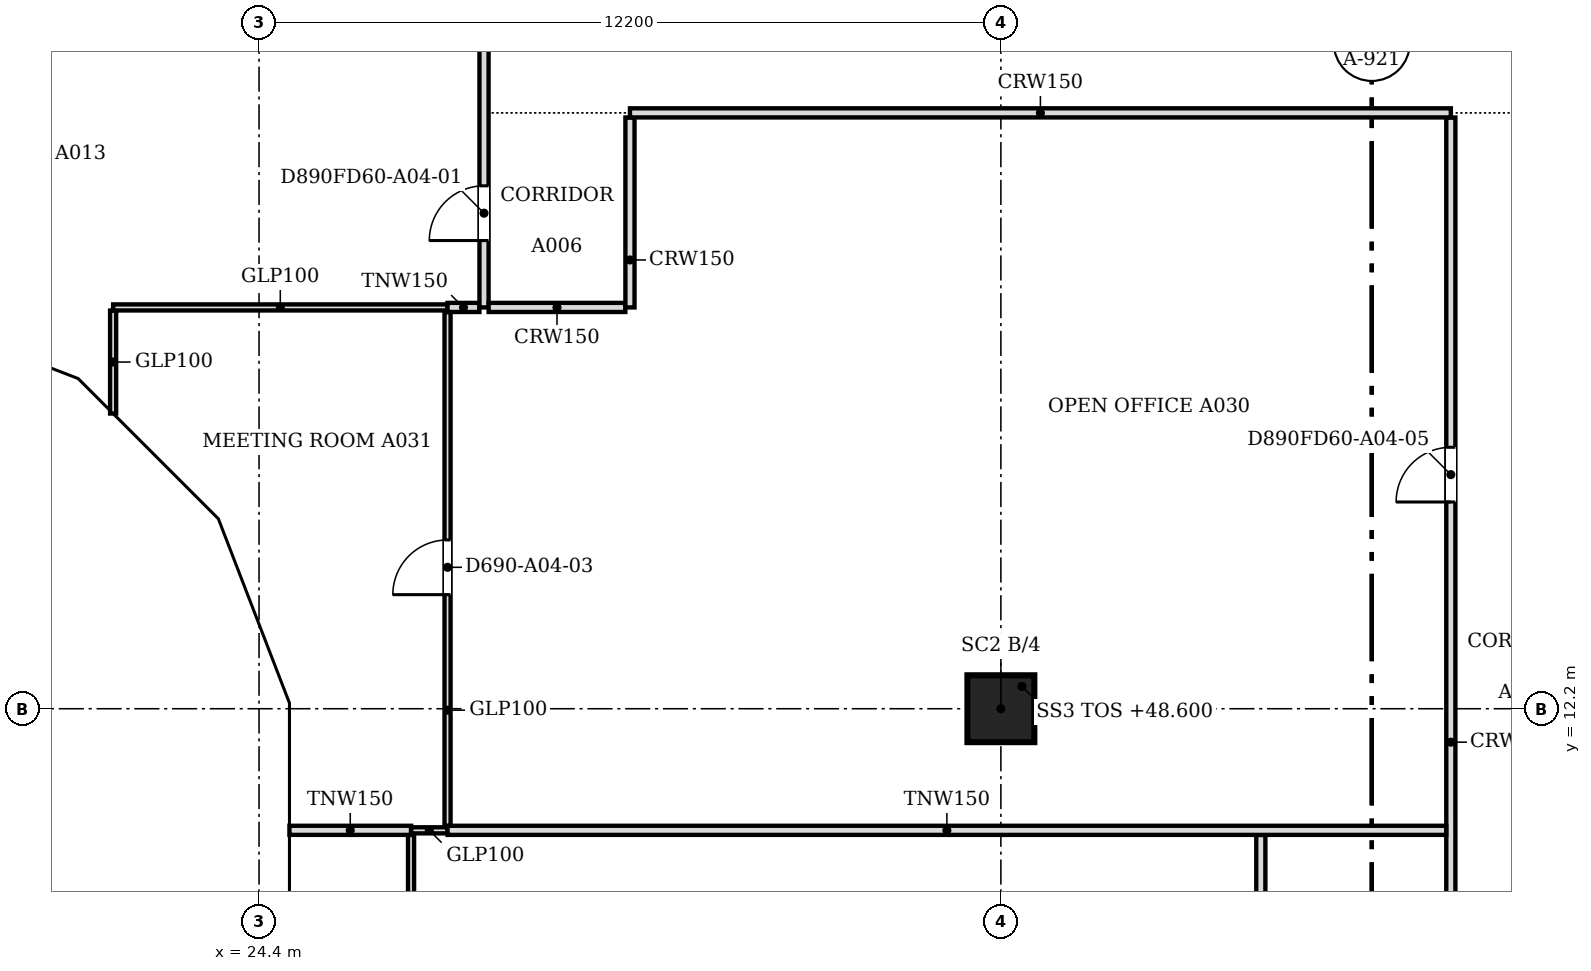
"""IFC4 building model, lengths in metres.
Left out: names, types, materials, properties, quantities, classifications, styles, units other than length and angle.
Written with IfcOpenShell. Run it as: python <this file> out.ifc"""

import sys

from ifc_helpers import new_model, si_unit, direction, frame, frame_2d, origin, origin_2d, place, context, subcontext, project, spatial, polyline, rectangle, outline, extrude, faceted_brep, source, transform, mapped, element, fill, save


model = new_model("IFC4")
c1 = context("Model", 3, precision=1e-05, world=origin(), true_north=direction((0.0, 1.0)))
c2 = subcontext(c1, "Body", "Model", "MODEL_VIEW")
j1 = project(units=[si_unit("LENGTHUNIT", "METRE"), si_unit("PLANEANGLEUNIT", "RADIAN")], contexts=[c1])
p1 = place(None, origin())
s1 = spatial("IfcSite", under=j1, at=p1, CompositionType="ELEMENT")
p2 = place(p1, origin())
s2 = spatial("IfcBuilding", under=s1, at=p2, CompositionType="ELEMENT")
p3 = place(p2, frame((0.0, 0.0, 48.6)))
s3 = spatial("IfcBuildingStorey", under=s2, at=p3, CompositionType="ELEMENT", Elevation=48.6)
p4 = place(p3, frame((36.6, 12.2, 0.0), z_axis=(0.0, 0.0, 1.0), x_axis=(1.0, 0.0, 0.0)))
e1 = element("IfcColumn", 1, at=p4, inside=s3, PredefinedType="COLUMN", context=c2, shape_type="SweptSolid", body=[
    extrude(rectangle(XDim=1.1, YDim=1.1, at=origin_2d()), origin(), (0.0, 0.0, 1.0), 3.6),
])
m1 = source(origin(), c2, "Body", "Brep", [
    faceted_brep([(0.093, -0.25, 0.056), (3.143, -0.25, 3.736), (3.143, -0.25, 3.864), (0.093, -0.25, 7.544), (0.0, 0.25, 7.543), (0.047, 0.25, 7.6), (3.196, 0.25, 3.8), (0.047, 0.25, 0.0), (0.0, 0.25, 0.057), (3.196, -0.0, 3.8), (0.047, 0.0, 0.0), (0.047, 0.0, 7.6)], [[[0, 1, 2, 3]], [[4, 5, 6, 7, 8]], [[7, 6, 9, 1, 0, 10]], [[6, 5, 11, 3, 2, 9]], [[5, 4, 11]], [[8, 7, 10]], [[8, 10, 0, 3, 11, 4]], [[1, 9, 2]]]),
])
p5 = place(p3, frame((18.303, 18.567, -3.8), z_axis=(0.0, 0.0, 1.0), x_axis=(0.932978940178, -0.359930961693, 0.0)))
e2 = element("IfcWall", 2, at=p5, inside=s3, PredefinedType="SOLIDWALL", context=c2, shape_type="MappedRepresentation", body=[
    mapped(m1, transform((0.0, 0.0, 0.0), scale=1.0)),
])
m2 = source(origin(), c2, "Body", "SweptSolid", [
    extrude(outline(polyline([(0.247, 0.633), (2.871, 3.8), (0.247, 6.967), (0.247, 0.633)])), frame((0.0, 0.26, 0.0), z_axis=(0.0, -1.0, 0.0), x_axis=(1.0, 0.0, 0.0)), (0.0, 0.0, 1.0), 0.52),
])
p6 = place(p5, origin())
e3 = element("IfcOpeningElement", 3, at=p6, cuts=e2, PredefinedType="OPENING", context=c2, shape_type="MappedRepresentation", body=[
    mapped(m2, transform((0.0, 0.0, 0.0), scale=1.0)),
])
m3 = source(origin(), c2, "Body", "Brep", [
    faceted_brep([(3.103, -0.25, 7.536), (0.053, -0.25, 3.864), (0.053, -0.25, 3.736), (3.103, -0.25, 0.064), (0.0, 0.25, 3.8), (3.156, 0.25, 7.6), (3.209, 0.25, 7.536), (3.209, 0.25, 0.064), (3.156, 0.25, 0.0), (3.156, -0.0, 0.0), (3.156, -0.0, 7.6), (0.0, 0.0, 3.8)], [[[0, 1, 2, 3]], [[4, 5, 6, 7, 8]], [[8, 7, 9]], [[6, 5, 10]], [[5, 4, 11, 1, 0, 10]], [[4, 8, 9, 3, 2, 11]], [[2, 1, 11]], [[3, 9, 7, 6, 10, 0]]]),
])
p7 = place(p3, frame((21.285, 17.417, -3.8), z_axis=(0.0, 0.0, 1.0), x_axis=(0.707106781187, -0.707106781187, 0.0)))
e4 = element("IfcWall", 4, at=p7, inside=s3, PredefinedType="SOLIDWALL", context=c2, shape_type="MappedRepresentation", body=[
    mapped(m3, transform((0.0, 0.0, 0.0), scale=1.0)),
])
m4 = source(origin(), c2, "Body", "SweptSolid", [
    extrude(outline(polyline([(2.956, 6.968), (0.325, 3.8), (2.956, 0.632), (2.956, 6.968)])), frame((0.0, 0.26, 0.0), z_axis=(0.0, -1.0, 0.0), x_axis=(1.0, 0.0, 0.0)), (0.0, 0.0, 1.0), 0.52),
])
p8 = place(p7, origin())
e5 = element("IfcOpeningElement", 5, at=p8, cuts=e4, PredefinedType="OPENING", context=c2, shape_type="MappedRepresentation", body=[
    mapped(m4, transform((0.0, 0.0, 0.0), scale=1.0)),
])
m5 = source(origin(), c2, "Body", "Brep", [
    faceted_brep([(0.106, -0.25, 0.064), (3.156, -0.25, 3.744), (3.156, -0.25, 3.856), (0.106, -0.25, 7.536), (0.0, 0.25, 7.536), (0.053, 0.25, 7.6), (3.202, 0.25, 3.8), (0.053, 0.25, 0.0), (0.0, 0.25, 0.064), (3.202, -0.0, 3.8), (0.053, 0.0, 0.0), (0.053, 0.0, 7.6)], [[[0, 1, 2, 3]], [[4, 5, 6, 7, 8]], [[7, 6, 9, 1, 0, 10]], [[6, 5, 11, 3, 2, 9]], [[5, 4, 11]], [[8, 7, 10]], [[8, 10, 0, 3, 11, 4]], [[1, 9, 2]]]),
])
p9 = place(p3, frame((23.497, 15.234, -3.8), z_axis=(0.0, 0.0, 1.0), x_axis=(0.359913782069, -0.932985567668, 0.0)))
e6 = element("IfcWall", 6, at=p9, inside=s3, PredefinedType="SOLIDWALL", context=c2, shape_type="MappedRepresentation", body=[
    mapped(m5, transform((0.0, 0.0, 0.0), scale=1.0)),
])
m6 = source(origin(), c2, "Body", "SweptSolid", [
    extrude(outline(polyline([(0.253, 0.633), (2.878, 3.8), (0.253, 6.967), (0.253, 0.633)])), frame((0.0, 0.26, 0.0), z_axis=(0.0, -1.0, 0.0), x_axis=(1.0, 0.0, 0.0)), (0.0, 0.0, 1.0), 0.52),
])
p10 = place(p9, origin())
e7 = element("IfcOpeningElement", 7, at=p10, cuts=e6, PredefinedType="OPENING", context=c2, shape_type="MappedRepresentation", body=[
    mapped(m6, transform((0.0, 0.0, 0.0), scale=1.0)),
])
m7 = source(origin(), c2, "Body", "Brep", [
    faceted_brep([(3.096, -0.25, 0.0), (6.1, -0.25, 3.8), (3.096, -0.25, 7.6), (0.047, -0.25, 3.857), (0.047, -0.25, 3.743), (0.0, 0.25, 3.8), (3.096, 0.25, 7.6), (6.053, 0.25, 3.859), (6.053, 0.25, 3.741), (3.096, 0.25, 0.0), (6.1, -0.0, 3.8), (0.0, 0.0, 3.8)], [[[0, 1, 2, 3, 4]], [[5, 6, 7, 8, 9]], [[9, 8, 10, 1, 0]], [[7, 6, 2, 1, 10]], [[6, 5, 11, 3, 2]], [[5, 9, 0, 4, 11]], [[4, 3, 11]], [[8, 7, 10]]]),
])
p11 = place(p3, frame((24.65, 12.247, -3.8), z_axis=(0.0, 0.0, 1.0), x_axis=(0.0, -1.0, 0.0)))
e8 = element("IfcWall", 8, at=p11, inside=s3, PredefinedType="SOLIDWALL", context=c2, shape_type="MappedRepresentation", body=[
    mapped(m7, transform((0.0, 0.0, 0.0), scale=1.0)),
])
m8 = source(origin(), c2, "Body", "SweptSolid", [
    extrude(outline(polyline([(3.094, 0.399), (5.781, 3.8), (3.094, 7.2), (0.323, 3.8), (3.094, 0.399)])), frame((0.0, 0.26, 0.0), z_axis=(0.0, -1.0, 0.0), x_axis=(1.0, 0.0, 0.0)), (0.0, 0.0, 1.0), 0.52),
])
p12 = place(p11, origin())
e9 = element("IfcOpeningElement", 9, at=p12, cuts=e8, PredefinedType="OPENING", context=c2, shape_type="MappedRepresentation", body=[
    mapped(m8, transform((0.0, 0.0, 0.0), scale=1.0)),
])
p13 = place(p2, frame((0.0, 0.0, 52.4)))
s4 = spatial("IfcBuildingStorey", under=s2, at=p13, CompositionType="ELEMENT", Elevation=52.4)
m9 = source(origin(), c2, "Body", "Brep", [
    faceted_brep([(3.096, -0.25, 7.536), (0.047, -0.25, 3.856), (0.047, -0.25, 3.744), (3.096, -0.25, 0.064), (0.0, 0.25, 3.8), (3.149, 0.25, 7.6), (3.202, 0.25, 7.536), (3.202, 0.25, 0.064), (3.149, 0.25, 0.0), (3.149, -0.0, 0.0), (3.149, -0.0, 7.6), (0.0, 0.0, 3.8)], [[[0, 1, 2, 3]], [[4, 5, 6, 7, 8]], [[8, 7, 9]], [[6, 5, 10]], [[5, 4, 11, 1, 0, 10]], [[4, 8, 9, 3, 2, 11]], [[11, 2, 1]], [[3, 9, 7, 6, 10, 0]]]),
])
p14 = place(p13, frame((18.346, 18.55, -3.8), z_axis=(0.0, 0.0, 1.0), x_axis=(0.932985567668, -0.359913782069, 0.0)))
e10 = element("IfcWall", 10, at=p14, inside=s4, PredefinedType="SOLIDWALL", context=c2, shape_type="MappedRepresentation", body=[
    mapped(m9, transform((0.0, 0.0, 0.0), scale=1.0)),
])
m10 = source(origin(), c2, "Body", "SweptSolid", [
    extrude(outline(polyline([(2.949, 6.967), (0.325, 3.8), (2.949, 0.633), (2.949, 6.967)])), frame((0.0, 0.26, 0.0), z_axis=(0.0, -1.0, 0.0), x_axis=(1.0, 0.0, 0.0)), (0.0, 0.0, 1.0), 0.52),
])
p15 = place(p14, origin())
e11 = element("IfcOpeningElement", 11, at=p15, cuts=e10, PredefinedType="OPENING", context=c2, shape_type="MappedRepresentation", body=[
    mapped(m10, transform((0.0, 0.0, 0.0), scale=1.0)),
])
m11 = source(origin(), c2, "Body", "Brep", [
    faceted_brep([(0.106, -0.25, 0.064), (3.156, -0.25, 3.736), (3.156, -0.25, 3.864), (0.106, -0.25, 7.536), (0.0, 0.25, 7.536), (0.053, 0.25, 7.6), (3.209, 0.25, 3.8), (0.053, 0.25, 0.0), (0.0, 0.25, 0.064), (3.209, -0.0, 3.8), (0.053, 0.0, 0.0), (0.053, 0.0, 7.6)], [[[0, 1, 2, 3]], [[4, 5, 6, 7, 8]], [[7, 6, 9, 1, 0, 10]], [[6, 5, 11, 3, 2, 9]], [[5, 4, 11]], [[8, 7, 10]], [[8, 10, 0, 3, 11, 4]], [[1, 9, 2]]]),
])
p16 = place(p13, frame((21.248, 17.454, -3.8), z_axis=(0.0, 0.0, 1.0), x_axis=(0.707106781187, -0.707106781187, 0.0)))
e12 = element("IfcWall", 12, at=p16, inside=s4, PredefinedType="SOLIDWALL", context=c2, shape_type="MappedRepresentation", body=[
    mapped(m11, transform((0.0, 0.0, 0.0), scale=1.0)),
])
m12 = source(origin(), c2, "Body", "SweptSolid", [
    extrude(outline(polyline([(0.253, 0.632), (2.884, 3.8), (0.253, 6.968), (0.253, 0.632)])), frame((0.0, 0.26, 0.0), z_axis=(0.0, -1.0, 0.0), x_axis=(1.0, 0.0, 0.0)), (0.0, 0.0, 1.0), 0.52),
])
p17 = place(p16, origin())
e13 = element("IfcOpeningElement", 13, at=p17, cuts=e12, PredefinedType="OPENING", context=c2, shape_type="MappedRepresentation", body=[
    mapped(m12, transform((0.0, 0.0, 0.0), scale=1.0)),
])
m13 = source(origin(), c2, "Body", "Brep", [
    faceted_brep([(3.103, -0.25, 7.544), (0.053, -0.25, 3.864), (0.053, -0.25, 3.736), (3.103, -0.25, 0.056), (0.0, 0.25, 3.8), (3.149, 0.25, 7.6), (3.196, 0.25, 7.543), (3.196, 0.25, 0.057), (3.149, 0.25, 0.0), (3.149, -0.0, 0.0), (3.149, -0.0, 7.6), (0.0, 0.0, 3.8)], [[[0, 1, 2, 3]], [[4, 5, 6, 7, 8]], [[8, 7, 9]], [[6, 5, 10]], [[5, 4, 11, 1, 0, 10]], [[4, 8, 9, 3, 2, 11]], [[11, 2, 1]], [[3, 9, 7, 6, 10, 0]]]),
])
p18 = place(p13, frame((23.517, 15.185, -3.8), z_axis=(0.0, 0.0, 1.0), x_axis=(0.359864468756, -0.933004589553, 0.0)))
e14 = element("IfcWall", 14, at=p18, inside=s4, PredefinedType="SOLIDWALL", context=c2, shape_type="MappedRepresentation", body=[
    mapped(m13, transform((0.0, 0.0, 0.0), scale=1.0)),
])
p19 = place(p18, origin())
e15 = element("IfcOpeningElement", 15, at=p19, cuts=e14, PredefinedType="OPENING", context=c2, shape_type="MappedRepresentation", body=[
    mapped(m10, transform((0.0, 0.0, 0.0), scale=1.0)),
])
m14 = source(origin(), c2, "Body", "Brep", [
    faceted_brep([(0.093, -0.25, 0.057), (3.143, -0.25, 3.8), (0.093, -0.25, 7.543), (0.0, 0.25, 7.544), (0.047, 0.25, 7.6), (3.143, 0.25, 3.8), (0.047, 0.25, 0.0), (0.0, 0.25, 0.056), (0.047, 0.0, 0.0), (0.047, 0.0, 7.6)], [[[0, 1, 2]], [[3, 4, 5, 6, 7]], [[6, 5, 1, 0, 8]], [[5, 4, 9, 2, 1]], [[4, 3, 9]], [[7, 6, 8]], [[7, 8, 0, 2, 9, 3]]]),
])
p20 = place(p13, frame((24.65, 12.293, -3.8), z_axis=(0.0, 0.0, 1.0), x_axis=(0.0, -1.0, 0.0)))
e16 = element("IfcWall", 16, at=p20, inside=s4, PredefinedType="SOLIDWALL", context=c2, shape_type="MappedRepresentation", body=[
    mapped(m14, transform((0.0, 0.0, 0.0), scale=1.0)),
])
m15 = source(origin(), c2, "Body", "SweptSolid", [
    extrude(outline(polyline([(0.247, 0.641), (2.821, 3.8), (0.247, 6.959), (0.247, 0.641)])), frame((0.0, 0.26, 0.0), z_axis=(0.0, -1.0, 0.0), x_axis=(1.0, 0.0, 0.0)), (0.0, 0.0, 1.0), 0.52),
])
p21 = place(p20, origin())
e17 = element("IfcOpeningElement", 17, at=p21, cuts=e16, PredefinedType="OPENING", context=c2, shape_type="MappedRepresentation", body=[
    mapped(m15, transform((0.0, 0.0, 0.0), scale=1.0)),
])
p22 = place(p3, frame((44.0, 0.5, 0.0), z_axis=(0.0, 0.0, 1.0), x_axis=(0.0, 1.0, 0.0)))
e18 = element("IfcWall", 18, at=p22, inside=s3, PredefinedType="PARTITIONING", context=c2, shape_type="SweptSolid", body=[
    extrude(rectangle(XDim=21.424, YDim=0.15, at=frame_2d((10.712, 0.0))), origin(), (0.0, 0.0, 1.0), 3.067),
])
m16 = source(origin(), c2, "Body", "SweptSolid", [
    extrude(rectangle(XDim=1.0, YDim=2.1, at=frame_2d((0.5, 1.05))), frame((0.0, 0.085, 0.0), z_axis=(0.0, -1.0, 0.0), x_axis=(1.0, 0.0, 0.0)), (0.0, 0.0, 1.0), 0.17),
])
p23 = place(p22, frame((6.2, 0.0, 0.0)))
e19 = element("IfcOpeningElement", 19, at=p23, cuts=e18, PredefinedType="OPENING", context=c2, shape_type="MappedRepresentation", body=[
    mapped(m16, transform((0.0, 0.0, 0.0), scale=1.0)),
])
m17 = source(origin(), c2, "Body", "SweptSolid", [
    extrude(rectangle(XDim=0.9, YDim=2.1, at=frame_2d((0.45, 1.05))), frame((0.0, 0.085, 0.0), z_axis=(0.0, -1.0, 0.0), x_axis=(1.0, 0.0, 0.0)), (0.0, 0.0, 1.0), 0.17),
])
p24 = place(p22, frame((15.1, 0.0, 0.0)))
e20 = element("IfcOpeningElement", 20, at=p24, cuts=e18, PredefinedType="OPENING", context=c2, shape_type="MappedRepresentation", body=[
    mapped(m17, transform((0.0, 0.0, 0.0), scale=1.0)),
])
p25 = place(p3, frame((26.9, 4.2, 0.0), z_axis=(0.0, 0.0, 1.0), x_axis=(0.0, 1.0, 0.0)))
e21 = element("IfcWall", 21, at=p25, inside=s3, PredefinedType="PARTITIONING", context=c2, shape_type="SweptSolid", body=[
    extrude(rectangle(XDim=5.924, YDim=0.1, at=frame_2d((2.962, 0.0))), origin(), (0.0, 0.0, 1.0), 3.067),
])
m18 = source(origin(), c2, "Body", "SweptSolid", [
    extrude(rectangle(XDim=0.9, YDim=2.1, at=frame_2d((0.45, 1.05))), frame((0.0, 0.06, 0.0), z_axis=(0.0, -1.0, 0.0), x_axis=(1.0, 0.0, 0.0)), (0.0, 0.0, 1.0), 0.12),
])
p26 = place(p25, frame((2.5, 0.0, 0.0)))
e22 = element("IfcOpeningElement", 22, at=p26, cuts=e21, PredefinedType="OPENING", context=c2, shape_type="MappedRepresentation", body=[
    mapped(m18, transform((0.0, 0.0, 0.0), scale=1.0)),
])
p27 = place(p3, frame((40.875, 4.2, 0.0), z_axis=(0.0, 0.0, 1.0), x_axis=(0.0, 1.0, 0.0)))
e23 = element("IfcWall", 23, at=p27, inside=s3, PredefinedType="PARTITIONING", context=c2, shape_type="SweptSolid", body=[
    extrude(rectangle(XDim=5.924, YDim=0.15, at=frame_2d((2.962, 0.0))), origin(), (0.0, 0.0, 1.0), 3.067),
])
p28 = place(p27, frame((2.5, 0.0, 0.0)))
e24 = element("IfcOpeningElement", 24, at=p28, cuts=e23, PredefinedType="OPENING", context=c2, shape_type="MappedRepresentation", body=[
    mapped(m17, transform((0.0, 0.0, 0.0), scale=1.0)),
])
p29 = place(p3, frame((24.9, 10.2, 0.0), z_axis=(0.0, 0.0, 1.0), x_axis=(1.0, 0.0, 0.0)))
e25 = element("IfcWall", 25, at=p29, inside=s3, PredefinedType="PARTITIONING", context=c2, shape_type="SweptSolid", body=[
    extrude(rectangle(XDim=2.0, YDim=0.15, at=frame_2d((1.0, 0.0))), origin(), (0.0, 0.0, 1.0), 3.067),
])
p30 = place(p3, frame((26.901, 10.2, 0.0), z_axis=(0.0, 0.0, 1.0), x_axis=(1.0, 0.0, 0.0)))
e26 = element("IfcWall", 26, at=p30, inside=s3, PredefinedType="PARTITIONING", context=c2, shape_type="SweptSolid", body=[
    extrude(rectangle(XDim=0.598, YDim=0.1, at=frame_2d((0.299, 0.0))), origin(), (0.0, 0.0, 1.0), 3.067),
])
p31 = place(p3, frame((27.5, 10.2, 0.0), z_axis=(0.0, 0.0, 1.0), x_axis=(1.0, 0.0, 0.0)))
e27 = element("IfcWall", 27, at=p31, inside=s3, PredefinedType="PARTITIONING", context=c2, shape_type="SweptSolid", body=[
    extrude(rectangle(XDim=16.424, YDim=0.15, at=frame_2d((8.212, 0.0))), origin(), (0.0, 0.0, 1.0), 3.067),
])
p32 = place(p3, frame((27.5, 10.276, 0.0), z_axis=(0.0, 0.0, 1.0), x_axis=(0.0, 1.0, 0.0)))
e28 = element("IfcWall", 28, at=p32, inside=s3, PredefinedType="PARTITIONING", context=c2, shape_type="SweptSolid", body=[
    extrude(rectangle(XDim=8.448, YDim=0.1, at=frame_2d((4.224, 0.0))), origin(), (0.0, 0.0, 1.0), 3.067),
])
p33 = place(p32, frame((3.8, 0.0, 0.0)))
e29 = element("IfcOpeningElement", 29, at=p33, cuts=e28, PredefinedType="OPENING", context=c2, shape_type="MappedRepresentation", body=[
    mapped(m18, transform((0.0, 0.0, 0.0), scale=1.0)),
])
p34 = place(p3, frame((22.0, 17.055, 0.0), z_axis=(0.0, 0.0, 1.0), x_axis=(0.0, 1.0, 0.0)))
e30 = element("IfcWall", 30, at=p34, inside=s3, PredefinedType="PARTITIONING", context=c2, shape_type="SweptSolid", body=[
    extrude(rectangle(XDim=1.694, YDim=0.1, at=frame_2d((0.847, 0.0))), origin(), (0.0, 0.0, 1.0), 3.067),
])
p35 = place(p3, frame((22.0, 18.8, 0.0), z_axis=(0.0, 0.0, 1.0), x_axis=(1.0, 0.0, 0.0)))
e31 = element("IfcWall", 31, at=p35, inside=s3, PredefinedType="PARTITIONING", context=c2, shape_type="SweptSolid", body=[
    extrude(rectangle(XDim=5.499, YDim=0.1, at=frame_2d((2.75, 0.0))), origin(), (0.0, 0.0, 1.0), 3.067),
])
p36 = place(p3, frame((27.5, 18.8, 0.0), z_axis=(0.0, 0.0, 1.0), x_axis=(1.0, 0.0, 0.0)))
e32 = element("IfcWall", 32, at=p36, inside=s3, PredefinedType="PARTITIONING", context=c2, shape_type="SweptSolid", body=[
    extrude(rectangle(XDim=0.524, YDim=0.15, at=frame_2d((0.262, 0.0))), origin(), (0.0, 0.0, 1.0), 3.067),
])
p37 = place(p3, frame((28.1, 18.8, 0.0), z_axis=(0.0, 0.0, 1.0), x_axis=(0.0, 1.0, 0.0)))
e33 = element("IfcWall", 33, at=p37, inside=s3, PredefinedType="PARTITIONING", context=c2, shape_type="SweptSolid", body=[
    extrude(rectangle(XDim=26.1, YDim=0.15, at=frame_2d((13.05, 0.0))), origin(), (0.0, 0.0, 1.0), 3.067),
])
p38 = place(p37, frame((1.1, 0.0, 0.0)))
e34 = element("IfcOpeningElement", 34, at=p38, cuts=e33, PredefinedType="OPENING", context=c2, shape_type="MappedRepresentation", body=[
    mapped(m17, transform((0.0, 0.0, 0.0), scale=1.0)),
])
p39 = place(p37, frame((22.951, 0.0, 0.0)))
e35 = element("IfcOpeningElement", 35, at=p39, cuts=e33, PredefinedType="OPENING", context=c2, shape_type="MappedRepresentation", body=[
    mapped(m16, transform((0.0, 0.0, 0.0), scale=1.0)),
])
p40 = place(p37, frame((17.251, 0.0, 0.0)))
e36 = element("IfcOpeningElement", 36, at=p40, cuts=e33, PredefinedType="OPENING", context=c2, shape_type="MappedRepresentation", body=[
    mapped(m16, transform((0.0, 0.0, 0.0), scale=1.0)),
])
p41 = place(p37, frame((9.7, 0.0, 0.0)))
e37 = element("IfcOpeningElement", 37, at=p41, cuts=e33, PredefinedType="OPENING", context=c2, shape_type="MappedRepresentation", body=[
    mapped(m16, transform((0.0, 0.0, 0.0), scale=1.0)),
])
p42 = place(p3, frame((28.176, 18.8, 0.0), z_axis=(0.0, 0.0, 1.0), x_axis=(1.0, 0.0, 0.0)))
e38 = element("IfcWall", 38, at=p42, inside=s3, PredefinedType="PARTITIONING", context=c2, shape_type="SweptSolid", body=[
    extrude(rectangle(XDim=2.248, YDim=0.15, at=frame_2d((1.124, 0.0))), origin(), (0.0, 0.0, 1.0), 3.067),
])
p43 = place(p3, frame((30.5, 18.8, 0.0), z_axis=(0.0, 0.0, 1.0), x_axis=(0.0, 1.0, 0.0)))
e39 = element("IfcWall", 39, at=p43, inside=s3, PredefinedType="PARTITIONING", context=c2, shape_type="SweptSolid", body=[
    extrude(rectangle(XDim=3.124, YDim=0.15, at=frame_2d((1.562, 0.0))), origin(), (0.0, 0.0, 1.0), 3.067),
])
p44 = place(p3, frame((30.5, 22.0, 0.0), z_axis=(0.0, 0.0, 1.0), x_axis=(1.0, 0.0, 0.0)))
e40 = element("IfcWall", 40, at=p44, inside=s3, PredefinedType="PARTITIONING", context=c2, shape_type="SweptSolid", body=[
    extrude(rectangle(XDim=13.5, YDim=0.15, at=frame_2d((6.75, 0.0))), origin(), (0.0, 0.0, 1.0), 3.067),
])
m19 = source(origin(), c2, "Body", "SweptSolid", [
    extrude(rectangle(XDim=0.9, YDim=2.1, at=frame_2d((0.45, 1.05))), frame((0.0, 0.025, 0.0), z_axis=(0.0, -1.0, 0.0), x_axis=(1.0, 0.0, 0.0)), (0.0, 0.0, 1.0), 0.05),
])
p45 = place(p38, origin())
e41 = element("IfcDoor", 41, at=p45, inside=s3, OperationType="SINGLE_SWING_LEFT", PredefinedType="DOOR", context=c2, shape_type="MappedRepresentation", body=[
    mapped(m19, transform((0.0, 0.0, 0.0), scale=1.0)),
])
fill(e34, e41)
p46 = place(p33, origin())
e42 = element("IfcDoor", 42, at=p46, inside=s3, OperationType="SINGLE_SWING_LEFT", PredefinedType="DOOR", context=c2, shape_type="MappedRepresentation", body=[
    mapped(m19, transform((0.0, 0.0, 0.0), scale=1.0)),
])
fill(e29, e42)
p47 = place(p24, origin())
e43 = element("IfcDoor", 43, at=p47, inside=s3, OperationType="SINGLE_SWING_LEFT", PredefinedType="DOOR", context=c2, shape_type="MappedRepresentation", body=[
    mapped(m19, transform((0.0, 0.0, 0.0), scale=1.0)),
])
fill(e20, e43)
save(model, sys.argv[1])
